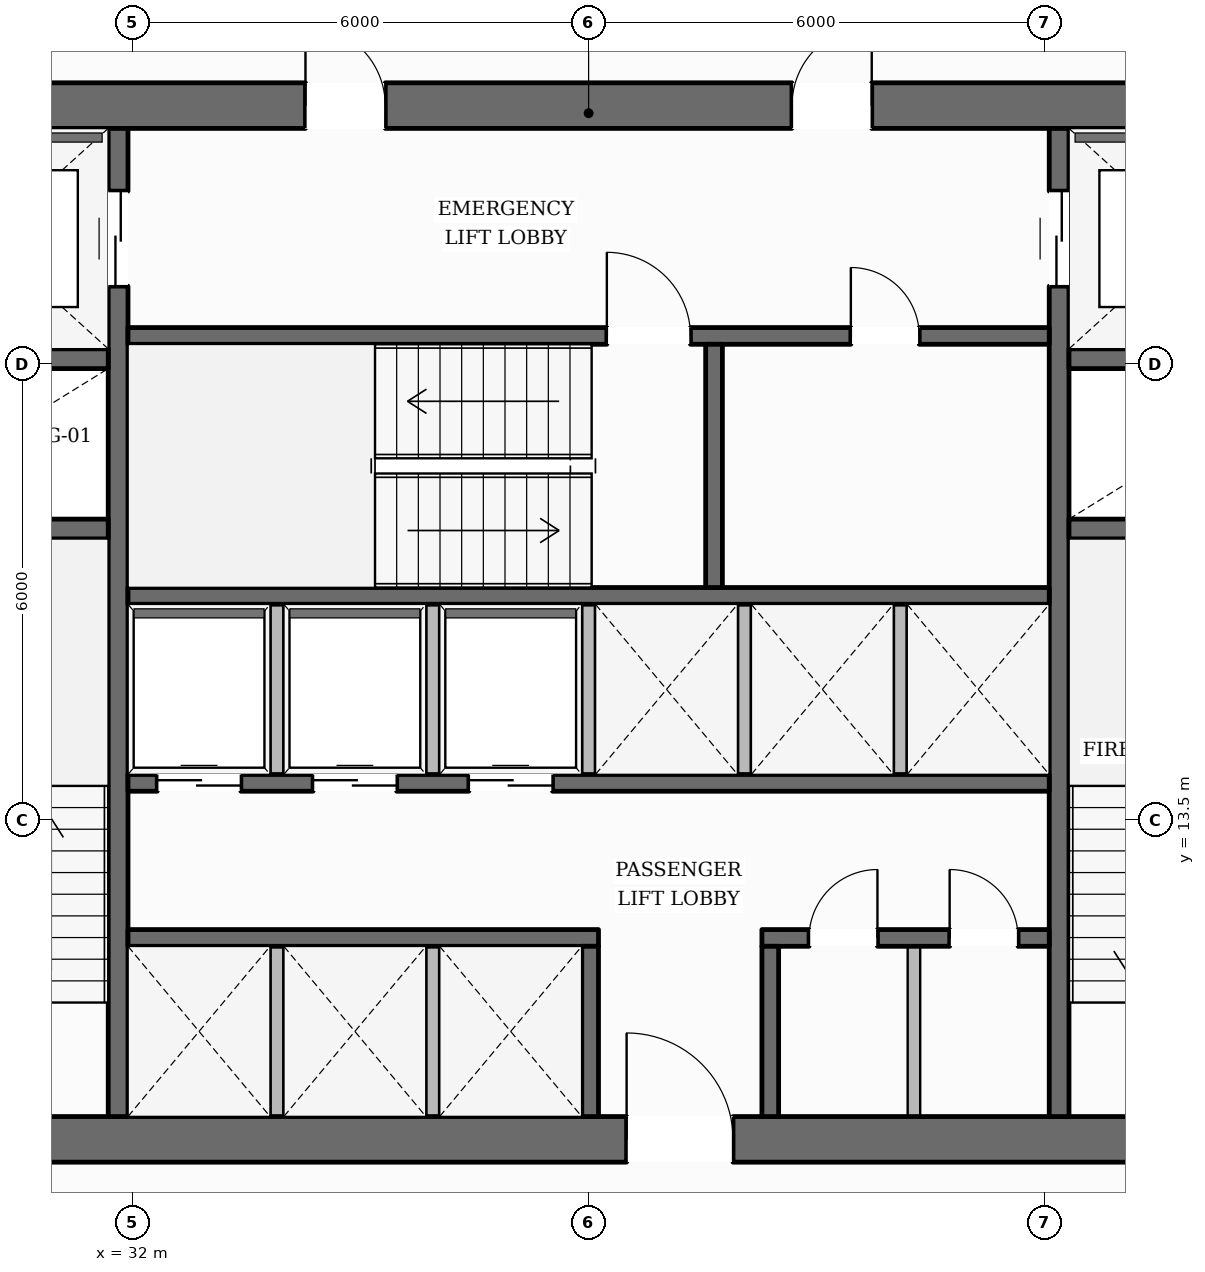
"""IFC4 building model, lengths in metres.
Left out: names, types, materials, properties, quantities, classifications, styles, units other than length and angle.
Written with IfcOpenShell. Run it as: python <this file> out.ifc"""

import sys

from ifc_helpers import new_model, si_unit, direction, frame, frame_2d, origin, place, context, subcontext, project, spatial, rectangle, extrude, element, fill, save


model = new_model("IFC4")
c1 = context("Model", 3, precision=1e-05, world=origin(), true_north=direction((0.0, 1.0)))
c2 = subcontext(c1, "Body", "Model", "MODEL_VIEW")
j1 = project(units=[si_unit("LENGTHUNIT", "METRE"), si_unit("PLANEANGLEUNIT", "RADIAN")], contexts=[c1])
p1 = place(None, origin())
s1 = spatial("IfcSite", under=j1, at=p1, CompositionType="ELEMENT")
p2 = place(p1, origin())
s2 = spatial("IfcBuilding", under=s1, at=p2, CompositionType="ELEMENT")
p3 = place(p2, frame((0.0, 0.0, 63.75)))
s3 = spatial("IfcBuildingStorey", under=s2, at=p3, CompositionType="ELEMENT", Elevation=63.75)
p4 = place(p3, frame((27.88, 9.3, 0.0), z_axis=(0.0, 0.0, 1.0), x_axis=(1.0, 0.0, 0.0)))
e1 = element("IfcWall", 1, at=p4, inside=s3, PredefinedType="SOLIDWALL", context=c2, shape_type="SweptSolid", body=[
    extrude(rectangle(XDim=20.24, YDim=0.6, at=frame_2d((10.12, 0.0))), origin(), (0.0, 0.0, 1.0), 3.59),
])
p5 = place(p4, frame((10.62, 0.0, 0.0)))
e2 = element("IfcOpeningElement", 2, at=p5, cuts=e1, PredefinedType="OPENING", context=c2, shape_type="SweptSolid", body=[
    extrude(rectangle(XDim=1.4, YDim=2.2, at=frame_2d((0.7, 1.1))), frame((0.0, 0.31, 0.0), z_axis=(0.0, -1.0, 0.0), x_axis=(1.0, 0.0, 0.0)), (0.0, 0.0, 1.0), 0.62),
])
p6 = place(p3, frame((27.88, 22.9, 0.0), z_axis=(0.0, 0.0, 1.0), x_axis=(1.0, 0.0, 0.0)))
e3 = element("IfcWall", 3, at=p6, inside=s3, PredefinedType="SOLIDWALL", context=c2, shape_type="SweptSolid", body=[
    extrude(rectangle(XDim=20.24, YDim=0.6, at=frame_2d((10.12, 0.0))), origin(), (0.0, 0.0, 1.0), 3.59),
])
p7 = place(p6, frame((6.395, 0.0, 0.0)))
e4 = element("IfcOpeningElement", 4, at=p7, cuts=e3, PredefinedType="OPENING", context=c2, shape_type="SweptSolid", body=[
    extrude(rectangle(XDim=1.05, YDim=2.15, at=frame_2d((0.525, 1.075))), frame((0.0, 0.31, 0.0), z_axis=(0.0, -1.0, 0.0), x_axis=(1.0, 0.0, 0.0)), (0.0, 0.0, 1.0), 0.62),
])
p8 = place(p6, frame((12.795, 0.0, 0.0)))
e5 = element("IfcOpeningElement", 5, at=p8, cuts=e3, PredefinedType="OPENING", context=c2, shape_type="SweptSolid", body=[
    extrude(rectangle(XDim=1.05, YDim=2.15, at=frame_2d((0.525, 1.075))), frame((0.0, 0.31, 0.0), z_axis=(0.0, -1.0, 0.0), x_axis=(1.0, 0.0, 0.0)), (0.0, 0.0, 1.0), 0.62),
])
p9 = place(p3, frame((31.81, 9.6, 0.0), z_axis=(0.0, 0.0, 1.0), x_axis=(0.0, 1.0, 0.0)))
e6 = element("IfcWall", 6, at=p9, inside=s3, PredefinedType="SHEAR", context=c2, shape_type="SweptSolid", body=[
    extrude(rectangle(XDim=13.0, YDim=0.26, at=frame_2d((6.5, 0.0))), origin(), (0.0, 0.0, 1.0), 3.59),
])
p10 = place(p9, frame((10.925, 0.0, 0.0)))
e7 = element("IfcOpeningElement", 7, at=p10, cuts=e6, PredefinedType="OPENING", context=c2, shape_type="SweptSolid", body=[
    extrude(rectangle(XDim=1.25, YDim=2.25, at=frame_2d((0.625, 1.125))), frame((0.0, 0.14, 0.0), z_axis=(0.0, -1.0, 0.0), x_axis=(1.0, 0.0, 0.0)), (0.0, 0.0, 1.0), 0.28),
])
p11 = place(p3, frame((44.19, 9.6, 0.0), z_axis=(0.0, 0.0, 1.0), x_axis=(0.0, 1.0, 0.0)))
e8 = element("IfcWall", 8, at=p11, inside=s3, PredefinedType="SHEAR", context=c2, shape_type="SweptSolid", body=[
    extrude(rectangle(XDim=13.0, YDim=0.26, at=frame_2d((6.5, 0.0))), origin(), (0.0, 0.0, 1.0), 3.59),
])
p12 = place(p11, frame((10.925, 0.0, 0.0)))
e9 = element("IfcOpeningElement", 9, at=p12, cuts=e8, PredefinedType="OPENING", context=c2, shape_type="SweptSolid", body=[
    extrude(rectangle(XDim=1.25, YDim=2.25, at=frame_2d((0.625, 1.125))), frame((0.0, 0.14, 0.0), z_axis=(0.0, -1.0, 0.0), x_axis=(1.0, 0.0, 0.0)), (0.0, 0.0, 1.0), 0.28),
])
for number, where, z_axis, x_axis in (
    (10, (28.48, 17.33, 0.0), (0.0, 0.0, 1.0), (1.0, 0.0, 0.0)),
    (11, (28.48, 19.57, 0.0), (0.0, 0.0, 1.0), (1.0, 0.0, 0.0)),
    (12, (44.32, 17.33, 0.0), (0.0, 0.0, 1.0), (1.0, 0.0, 0.0)),
    (13, (44.32, 19.57, 0.0), (0.0, 0.0, 1.0), (1.0, 0.0, 0.0)),
):
    element("IfcWall", number, at=place(p3, frame(where, z_axis=z_axis, x_axis=x_axis)), inside=s3, PredefinedType="SHEAR", context=c2, shape_type="SweptSolid", body=[
        extrude(rectangle(XDim=3.2, YDim=0.26, at=frame_2d((1.6, 0.0))), origin(), (0.0, 0.0, 1.0), 3.59),
    ])
p13 = place(p3, frame((31.94, 19.87, 0.0), z_axis=(0.0, 0.0, 1.0), x_axis=(1.0, 0.0, 0.0)))
e14 = element("IfcWall", 14, at=p13, inside=s3, PredefinedType="SOLIDWALL", context=c2, shape_type="SweptSolid", body=[
    extrude(rectangle(XDim=12.12, YDim=0.22, at=frame_2d((6.06, 0.0))), origin(), (0.0, 0.0, 1.0), 3.59),
])
p14 = place(p13, frame((6.3, 0.0, 0.0)))
e15 = element("IfcOpeningElement", 15, at=p14, cuts=e14, PredefinedType="OPENING", context=c2, shape_type="SweptSolid", body=[
    extrude(rectangle(XDim=1.1, YDim=2.15, at=frame_2d((0.55, 1.075))), frame((0.0, 0.12, 0.0), z_axis=(0.0, -1.0, 0.0), x_axis=(1.0, 0.0, 0.0)), (0.0, 0.0, 1.0), 0.24),
])
p15 = place(p13, frame((9.51, 0.0, 0.0)))
e16 = element("IfcOpeningElement", 16, at=p15, cuts=e14, PredefinedType="OPENING", context=c2, shape_type="SweptSolid", body=[
    extrude(rectangle(XDim=0.9, YDim=2.1, at=frame_2d((0.45, 1.05))), frame((0.0, 0.12, 0.0), z_axis=(0.0, -1.0, 0.0), x_axis=(1.0, 0.0, 0.0)), (0.0, 0.0, 1.0), 0.24),
])
p16 = place(p3, frame((31.94, 16.45, 0.0), z_axis=(0.0, 0.0, 1.0), x_axis=(1.0, 0.0, 0.0)))
e17 = element("IfcWall", 17, at=p16, inside=s3, PredefinedType="SOLIDWALL", context=c2, shape_type="SweptSolid", body=[
    extrude(rectangle(XDim=12.12, YDim=0.22, at=frame_2d((6.06, 0.0))), origin(), (0.0, 0.0, 1.0), 3.59),
])
p17 = place(p3, frame((39.65, 16.56, 0.0), z_axis=(0.0, 0.0, 1.0), x_axis=(0.0, 1.0, 0.0)))
e18 = element("IfcWall", 18, at=p17, inside=s3, PredefinedType="SOLIDWALL", context=c2, shape_type="SweptSolid", body=[
    extrude(rectangle(XDim=3.2, YDim=0.22, at=frame_2d((1.6, 0.0))), origin(), (0.0, 0.0, 1.0), 3.59),
])
p18 = place(p3, frame((31.94, 13.99, 0.0), z_axis=(0.0, 0.0, 1.0), x_axis=(1.0, 0.0, 0.0)))
e19 = element("IfcWall", 19, at=p18, inside=s3, PredefinedType="SOLIDWALL", context=c2, shape_type="SweptSolid", body=[
    extrude(rectangle(XDim=12.12, YDim=0.22, at=frame_2d((6.06, 0.0))), origin(), (0.0, 0.0, 1.0), 3.59),
])
p19 = place(p18, frame((0.385, 0.0, 0.0)))
e20 = element("IfcOpeningElement", 20, at=p19, cuts=e19, PredefinedType="OPENING", context=c2, shape_type="SweptSolid", body=[
    extrude(rectangle(XDim=1.1, YDim=2.2, at=frame_2d((0.55, 1.1))), frame((0.0, 0.12, 0.0), z_axis=(0.0, -1.0, 0.0), x_axis=(1.0, 0.0, 0.0)), (0.0, 0.0, 1.0), 0.24),
])
p20 = place(p18, frame((2.435, 0.0, 0.0)))
e21 = element("IfcOpeningElement", 21, at=p20, cuts=e19, PredefinedType="OPENING", context=c2, shape_type="SweptSolid", body=[
    extrude(rectangle(XDim=1.1, YDim=2.2, at=frame_2d((0.55, 1.1))), frame((0.0, 0.12, 0.0), z_axis=(0.0, -1.0, 0.0), x_axis=(1.0, 0.0, 0.0)), (0.0, 0.0, 1.0), 0.24),
])
p21 = place(p18, frame((4.485, 0.0, 0.0)))
e22 = element("IfcOpeningElement", 22, at=p21, cuts=e19, PredefinedType="OPENING", context=c2, shape_type="SweptSolid", body=[
    extrude(rectangle(XDim=1.1, YDim=2.2, at=frame_2d((0.55, 1.1))), frame((0.0, 0.12, 0.0), z_axis=(0.0, -1.0, 0.0), x_axis=(1.0, 0.0, 0.0)), (0.0, 0.0, 1.0), 0.24),
])
p22 = place(p3, frame((31.94, 11.95, 0.0), z_axis=(0.0, 0.0, 1.0), x_axis=(1.0, 0.0, 0.0)))
e23 = element("IfcWall", 23, at=p22, inside=s3, PredefinedType="SOLIDWALL", context=c2, shape_type="SweptSolid", body=[
    extrude(rectangle(XDim=6.19, YDim=0.22, at=frame_2d((3.095, 0.0))), origin(), (0.0, 0.0, 1.0), 3.59),
])
p23 = place(p3, frame((40.28, 11.95, 0.0), z_axis=(0.0, 0.0, 1.0), x_axis=(1.0, 0.0, 0.0)))
e24 = element("IfcWall", 24, at=p23, inside=s3, PredefinedType="SOLIDWALL", context=c2, shape_type="SweptSolid", body=[
    extrude(rectangle(XDim=3.78, YDim=0.22, at=frame_2d((1.89, 0.0))), origin(), (0.0, 0.0, 1.0), 3.59),
])
p24 = place(p23, frame((0.62, 0.0, 0.0)))
e25 = element("IfcOpeningElement", 25, at=p24, cuts=e24, PredefinedType="OPENING", context=c2, shape_type="SweptSolid", body=[
    extrude(rectangle(XDim=0.9, YDim=2.1, at=frame_2d((0.45, 1.05))), frame((0.0, 0.12, 0.0), z_axis=(0.0, -1.0, 0.0), x_axis=(1.0, 0.0, 0.0)), (0.0, 0.0, 1.0), 0.24),
])
p25 = place(p23, frame((2.47, 0.0, 0.0)))
e26 = element("IfcOpeningElement", 26, at=p25, cuts=e24, PredefinedType="OPENING", context=c2, shape_type="SweptSolid", body=[
    extrude(rectangle(XDim=0.9, YDim=2.1, at=frame_2d((0.45, 1.05))), frame((0.0, 0.12, 0.0), z_axis=(0.0, -1.0, 0.0), x_axis=(1.0, 0.0, 0.0)), (0.0, 0.0, 1.0), 0.24),
])
for number, where, z_axis, x_axis in (
    (27, (38.02, 9.6, 0.0), (0.0, 0.0, 1.0), (0.0, 1.0, 0.0)),
    (28, (40.39, 9.6, 0.0), (0.0, 0.0, 1.0), (0.0, 1.0, 0.0)),
):
    element("IfcWall", number, at=place(p3, frame(where, z_axis=z_axis, x_axis=x_axis)), inside=s3, PredefinedType="SOLIDWALL", context=c2, shape_type="SweptSolid", body=[
        extrude(rectangle(XDim=2.24, YDim=0.22, at=frame_2d((1.12, 0.0))), origin(), (0.0, 0.0, 1.0), 3.59),
    ])
p26 = place(p3, frame((12.6, 13.478, 0.0), z_axis=(0.0, 0.0, 1.0), x_axis=(0.505426781382, 0.862869496889, 0.0)))
e29 = element("IfcWall", 29, at=p26, inside=s3, PredefinedType="STANDARD", context=c2, shape_type="SweptSolid", body=[
    extrude(rectangle(XDim=35.985, YDim=0.38, at=frame_2d((17.992, 0.0))), origin(), (0.0, 0.0, 1.0), 2.97),
])
p27 = place(p26, frame((31.766, 0.0, 0.65)))
e30 = element("IfcOpeningElement", 30, at=p27, cuts=e29, PredefinedType="OPENING", context=c2, shape_type="SweptSolid", body=[
    extrude(rectangle(XDim=1.65, YDim=1.75, at=frame_2d((0.825, 0.875))), frame((0.0, 0.2, 0.0), z_axis=(0.0, -1.0, 0.0), x_axis=(1.0, 0.0, 0.0)), (0.0, 0.0, 1.0), 0.4),
])
p28 = place(p26, frame((25.928, 0.0, 0.65)))
e31 = element("IfcOpeningElement", 31, at=p28, cuts=e29, PredefinedType="OPENING", context=c2, shape_type="SweptSolid", body=[
    extrude(rectangle(XDim=1.65, YDim=1.75, at=frame_2d((0.825, 0.875))), frame((0.0, 0.2, 0.0), z_axis=(0.0, -1.0, 0.0), x_axis=(1.0, 0.0, 0.0)), (0.0, 0.0, 1.0), 0.4),
])
p29 = place(p26, frame((8.413, 0.0, 0.65)))
e32 = element("IfcOpeningElement", 32, at=p29, cuts=e29, PredefinedType="OPENING", context=c2, shape_type="SweptSolid", body=[
    extrude(rectangle(XDim=1.65, YDim=1.75, at=frame_2d((0.825, 0.875))), frame((0.0, 0.2, 0.0), z_axis=(0.0, -1.0, 0.0), x_axis=(1.0, 0.0, 0.0)), (0.0, 0.0, 1.0), 0.4),
])
p30 = place(p26, frame((2.574, 0.0, 0.65)))
e33 = element("IfcOpeningElement", 33, at=p30, cuts=e29, PredefinedType="OPENING", context=c2, shape_type="SweptSolid", body=[
    extrude(rectangle(XDim=1.65, YDim=1.75, at=frame_2d((0.825, 0.875))), frame((0.0, 0.2, 0.0), z_axis=(0.0, -1.0, 0.0), x_axis=(1.0, 0.0, 0.0)), (0.0, 0.0, 1.0), 0.4),
])
p31 = place(p3, frame((45.15, 44.565, 0.0), z_axis=(0.0, 0.0, 1.0), x_axis=(0.503346513102, -0.864084653114, 0.0)))
e34 = element("IfcWall", 34, at=p31, inside=s3, PredefinedType="STANDARD", context=c2, shape_type="SweptSolid", body=[
    extrude(rectangle(XDim=35.835, YDim=0.38, at=frame_2d((17.917, 0.0))), origin(), (0.0, 0.0, 1.0), 2.97),
])
p32 = place(p31, frame((26.276, 0.0, 0.0)))
e35 = element("IfcOpeningElement", 35, at=p32, cuts=e34, PredefinedType="OPENING", context=c2, shape_type="SweptSolid", body=[
    extrude(rectangle(XDim=1.0, YDim=2.2, at=frame_2d((0.5, 1.1))), frame((0.0, 0.2, 0.0), z_axis=(0.0, -1.0, 0.0), x_axis=(1.0, 0.0, 0.0)), (0.0, 0.0, 1.0), 0.4),
])
p33 = place(p31, frame((31.623, 0.0, 0.65)))
e36 = element("IfcOpeningElement", 36, at=p33, cuts=e34, PredefinedType="OPENING", context=c2, shape_type="SweptSolid", body=[
    extrude(rectangle(XDim=1.65, YDim=1.75, at=frame_2d((0.825, 0.875))), frame((0.0, 0.2, 0.0), z_axis=(0.0, -1.0, 0.0), x_axis=(1.0, 0.0, 0.0)), (0.0, 0.0, 1.0), 0.4),
])
p34 = place(p31, frame((19.997, 0.0, 0.65)))
e37 = element("IfcOpeningElement", 37, at=p34, cuts=e34, PredefinedType="OPENING", context=c2, shape_type="SweptSolid", body=[
    extrude(rectangle(XDim=1.65, YDim=1.75, at=frame_2d((0.825, 0.875))), frame((0.0, 0.2, 0.0), z_axis=(0.0, -1.0, 0.0), x_axis=(1.0, 0.0, 0.0)), (0.0, 0.0, 1.0), 0.4),
])
p35 = place(p31, frame((8.371, 0.0, 0.65)))
e38 = element("IfcOpeningElement", 38, at=p35, cuts=e34, PredefinedType="OPENING", context=c2, shape_type="SweptSolid", body=[
    extrude(rectangle(XDim=1.65, YDim=1.75, at=frame_2d((0.825, 0.875))), frame((0.0, 0.2, 0.0), z_axis=(0.0, -1.0, 0.0), x_axis=(1.0, 0.0, 0.0)), (0.0, 0.0, 1.0), 0.4),
])
p36 = place(p31, frame((2.558, 0.0, 0.65)))
e39 = element("IfcOpeningElement", 39, at=p36, cuts=e34, PredefinedType="OPENING", context=c2, shape_type="SweptSolid", body=[
    extrude(rectangle(XDim=1.65, YDim=1.75, at=frame_2d((0.825, 0.875))), frame((0.0, 0.2, 0.0), z_axis=(0.0, -1.0, 0.0), x_axis=(1.0, 0.0, 0.0)), (0.0, 0.0, 1.0), 0.4),
])
for number, where, z_axis, x_axis in (
    (40, (33.9, 9.6, 0.0), (0.0, 0.0, 1.0), (0.0, 1.0, 0.0)),
    (41, (35.95, 9.6, 0.0), (0.0, 0.0, 1.0), (0.0, 1.0, 0.0)),
    (42, (33.9, 14.1, 0.0), (0.0, 0.0, 1.0), (0.0, 1.0, 0.0)),
    (43, (35.95, 14.1, 0.0), (0.0, 0.0, 1.0), (0.0, 1.0, 0.0)),
    (44, (38.0, 14.1, 0.0), (0.0, 0.0, 1.0), (0.0, 1.0, 0.0)),
    (45, (40.05, 14.1, 0.0), (0.0, 0.0, 1.0), (0.0, 1.0, 0.0)),
    (46, (42.1, 14.1, 0.0), (0.0, 0.0, 1.0), (0.0, 1.0, 0.0)),
    (47, (42.28, 9.6, 0.0), (0.0, 0.0, 1.0), (0.0, 1.0, 0.0)),
):
    element("IfcWall", number, at=place(p3, frame(where, z_axis=z_axis, x_axis=x_axis)), inside=s3, PredefinedType="PARTITIONING", context=c2, shape_type="SweptSolid", body=[
        extrude(rectangle(XDim=2.24, YDim=0.165, at=frame_2d((1.12, 0.0))), origin(), (0.0, 0.0, 1.0), 3.59),
    ])
p37 = place(p14, origin())
e48 = element("IfcDoor", 48, at=p37, inside=s3, OperationType="SINGLE_SWING_LEFT", PredefinedType="DOOR", context=c2, shape_type="SweptSolid", body=[
    extrude(rectangle(XDim=1.1, YDim=2.15, at=frame_2d((0.55, 1.075))), frame((0.0, 0.025, 0.0), z_axis=(0.0, -1.0, 0.0), x_axis=(1.0, 0.0, 0.0)), (0.0, 0.0, 1.0), 0.05),
])
fill(e15, e48)
p38 = place(p7, origin())
e49 = element("IfcDoor", 49, at=p38, inside=s3, OperationType="SINGLE_SWING_LEFT", PredefinedType="DOOR", context=c2, shape_type="SweptSolid", body=[
    extrude(rectangle(XDim=1.05, YDim=2.15, at=frame_2d((0.525, 1.075))), frame((0.0, 0.025, 0.0), z_axis=(0.0, -1.0, 0.0), x_axis=(1.0, 0.0, 0.0)), (0.0, 0.0, 1.0), 0.05),
])
fill(e4, e49)
p39 = place(p8, origin())
e50 = element("IfcDoor", 50, at=p39, inside=s3, OperationType="SINGLE_SWING_RIGHT", PredefinedType="DOOR", context=c2, shape_type="SweptSolid", body=[
    extrude(rectangle(XDim=1.05, YDim=2.15, at=frame_2d((0.525, 1.075))), frame((0.0, 0.025, 0.0), z_axis=(0.0, -1.0, 0.0), x_axis=(1.0, 0.0, 0.0)), (0.0, 0.0, 1.0), 0.05),
])
fill(e5, e50)
p40 = place(p10, origin())
e51 = element("IfcDoor", 51, at=p40, inside=s3, OperationType="DOUBLE_DOOR_SLIDING", PredefinedType="DOOR", context=c2, shape_type="SweptSolid", body=[
    extrude(rectangle(XDim=1.25, YDim=2.25, at=frame_2d((0.625, 1.125))), frame((0.0, 0.025, 0.0), z_axis=(0.0, -1.0, 0.0), x_axis=(1.0, 0.0, 0.0)), (0.0, 0.0, 1.0), 0.05),
])
fill(e7, e51)
p41 = place(p12, origin())
e52 = element("IfcDoor", 52, at=p41, inside=s3, OperationType="DOUBLE_DOOR_SLIDING", PredefinedType="DOOR", context=c2, shape_type="SweptSolid", body=[
    extrude(rectangle(XDim=1.25, YDim=2.25, at=frame_2d((0.625, 1.125))), frame((0.0, 0.025, 0.0), z_axis=(0.0, -1.0, 0.0), x_axis=(1.0, 0.0, 0.0)), (0.0, 0.0, 1.0), 0.05),
])
fill(e9, e52)
p42 = place(p5, origin())
e53 = element("IfcDoor", 53, at=p42, inside=s3, OperationType="SINGLE_SWING_LEFT", PredefinedType="DOOR", context=c2, shape_type="SweptSolid", body=[
    extrude(rectangle(XDim=1.4, YDim=2.2, at=frame_2d((0.7, 1.1))), frame((0.0, 0.025, 0.0), z_axis=(0.0, -1.0, 0.0), x_axis=(1.0, 0.0, 0.0)), (0.0, 0.0, 1.0), 0.05),
])
fill(e2, e53)
p43 = place(p19, origin())
e54 = element("IfcDoor", 54, at=p43, inside=s3, OperationType="DOUBLE_DOOR_SLIDING", PredefinedType="DOOR", context=c2, shape_type="SweptSolid", body=[
    extrude(rectangle(XDim=1.1, YDim=2.2, at=frame_2d((0.55, 1.1))), frame((0.0, 0.025, 0.0), z_axis=(0.0, -1.0, 0.0), x_axis=(1.0, 0.0, 0.0)), (0.0, 0.0, 1.0), 0.05),
])
fill(e20, e54)
p44 = place(p20, origin())
e55 = element("IfcDoor", 55, at=p44, inside=s3, OperationType="DOUBLE_DOOR_SLIDING", PredefinedType="DOOR", context=c2, shape_type="SweptSolid", body=[
    extrude(rectangle(XDim=1.1, YDim=2.2, at=frame_2d((0.55, 1.1))), frame((0.0, 0.025, 0.0), z_axis=(0.0, -1.0, 0.0), x_axis=(1.0, 0.0, 0.0)), (0.0, 0.0, 1.0), 0.05),
])
fill(e21, e55)
p45 = place(p21, origin())
e56 = element("IfcDoor", 56, at=p45, inside=s3, OperationType="DOUBLE_DOOR_SLIDING", PredefinedType="DOOR", context=c2, shape_type="SweptSolid", body=[
    extrude(rectangle(XDim=1.1, YDim=2.2, at=frame_2d((0.55, 1.1))), frame((0.0, 0.025, 0.0), z_axis=(0.0, -1.0, 0.0), x_axis=(1.0, 0.0, 0.0)), (0.0, 0.0, 1.0), 0.05),
])
fill(e22, e56)
p46 = place(p15, origin())
e57 = element("IfcDoor", 57, at=p46, inside=s3, OperationType="SINGLE_SWING_LEFT", PredefinedType="DOOR", context=c2, shape_type="SweptSolid", body=[
    extrude(rectangle(XDim=0.9, YDim=2.1, at=frame_2d((0.45, 1.05))), frame((0.0, 0.025, 0.0), z_axis=(0.0, -1.0, 0.0), x_axis=(1.0, 0.0, 0.0)), (0.0, 0.0, 1.0), 0.05),
])
fill(e16, e57)
p47 = place(p24, origin())
e58 = element("IfcDoor", 58, at=p47, inside=s3, OperationType="SINGLE_SWING_RIGHT", PredefinedType="DOOR", context=c2, shape_type="SweptSolid", body=[
    extrude(rectangle(XDim=0.9, YDim=2.1, at=frame_2d((0.45, 1.05))), frame((0.0, 0.025, 0.0), z_axis=(0.0, -1.0, 0.0), x_axis=(1.0, 0.0, 0.0)), (0.0, 0.0, 1.0), 0.05),
])
fill(e25, e58)
p48 = place(p25, origin())
e59 = element("IfcDoor", 59, at=p48, inside=s3, OperationType="SINGLE_SWING_LEFT", PredefinedType="DOOR", context=c2, shape_type="SweptSolid", body=[
    extrude(rectangle(XDim=0.9, YDim=2.1, at=frame_2d((0.45, 1.05))), frame((0.0, 0.025, 0.0), z_axis=(0.0, -1.0, 0.0), x_axis=(1.0, 0.0, 0.0)), (0.0, 0.0, 1.0), 0.05),
])
fill(e26, e59)
save(model, sys.argv[1])
